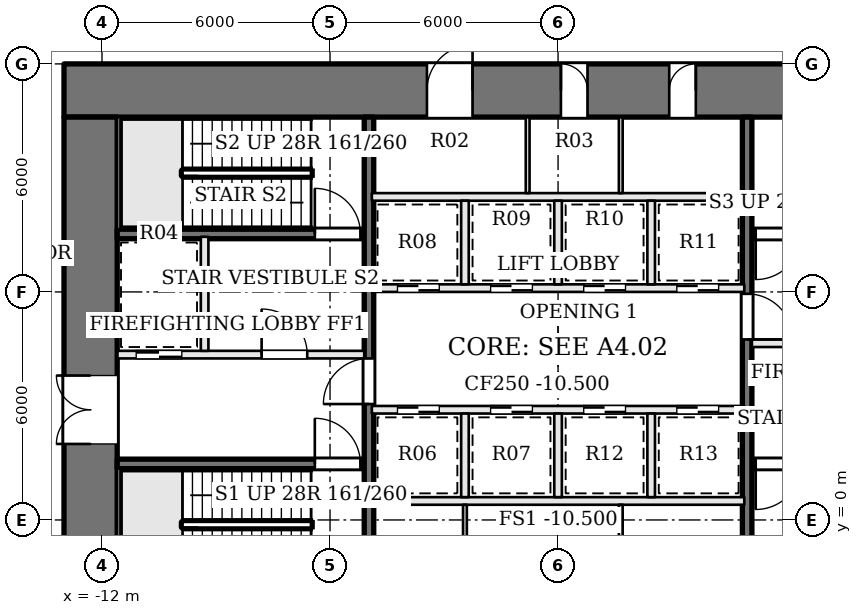
"""IFC4 building model, lengths in metres.
Left out: names, types, materials, properties, quantities, classifications, styles, units other than length and angle.
Written with IfcOpenShell. Run it as: python <this file> out.ifc"""

import sys

from ifc_helpers import new_model, si_unit, direction, frame, frame_2d, origin, place, context, subcontext, project, spatial, rectangle, extrude, element, fill, save


model = new_model("IFC4")
c1 = context("Model", 3, precision=1e-05, world=origin(), true_north=direction((0.0, 1.0)))
c2 = subcontext(c1, "Body", "Model", "MODEL_VIEW")
j1 = project(units=[si_unit("LENGTHUNIT", "METRE"), si_unit("PLANEANGLEUNIT", "RADIAN")], contexts=[c1])
p1 = place(None, origin())
s1 = spatial("IfcSite", under=j1, at=p1, CompositionType="ELEMENT")
p2 = place(p1, origin())
s2 = spatial("IfcBuilding", under=s1, at=p2, CompositionType="ELEMENT")
p3 = place(p2, frame((0.0, 0.0, -10.5)))
s3 = spatial("IfcBuildingStorey", under=s2, at=p3, CompositionType="ELEMENT", Elevation=-10.5)
p4 = place(p3, frame((-13.0, 11.3, 0.0), z_axis=(0.0, 0.0, 1.0), x_axis=(1.0, 0.0, 0.0)))
e1 = element("IfcWall", 1, at=p4, inside=s3, PredefinedType="SHEAR", context=c2, shape_type="SweptSolid", body=[
    extrude(rectangle(XDim=26.0, YDim=1.4, at=frame_2d((13.0, 0.0))), origin(), (0.0, 0.0, 1.0), 4.5),
])
p5 = place(p4, frame((9.55, 0.0, 0.0)))
e2 = element("IfcOpeningElement", 2, at=p5, cuts=e1, PredefinedType="OPENING", context=c2, shape_type="SweptSolid", body=[
    extrude(rectangle(XDim=1.2, YDim=2.1, at=frame_2d((0.6, 1.05))), frame((0.0, 0.71, 0.0), z_axis=(0.0, -1.0, 0.0), x_axis=(1.0, 0.0, 0.0)), (0.0, 0.0, 1.0), 1.42),
])
p6 = place(p4, frame((13.075, 0.0, 0.0)))
e3 = element("IfcOpeningElement", 3, at=p6, cuts=e1, PredefinedType="OPENING", context=c2, shape_type="SweptSolid", body=[
    extrude(rectangle(XDim=0.7, YDim=2.1, at=frame_2d((0.35, 1.05))), frame((0.0, 0.71, 0.0), z_axis=(0.0, -1.0, 0.0), x_axis=(1.0, 0.0, 0.0)), (0.0, 0.0, 1.0), 1.42),
])
p7 = place(p4, frame((15.925, 0.0, 0.0)))
e4 = element("IfcOpeningElement", 4, at=p7, cuts=e1, PredefinedType="OPENING", context=c2, shape_type="SweptSolid", body=[
    extrude(rectangle(XDim=0.7, YDim=2.1, at=frame_2d((0.35, 1.05))), frame((0.0, 0.71, 0.0), z_axis=(0.0, -1.0, 0.0), x_axis=(1.0, 0.0, 0.0)), (0.0, 0.0, 1.0), 1.42),
])
p8 = place(p3, frame((-12.3, -1.6, 0.0), z_axis=(0.0, 0.0, 1.0), x_axis=(0.0, 1.0, 0.0)))
e5 = element("IfcWall", 5, at=p8, inside=s3, PredefinedType="SHEAR", context=c2, shape_type="SweptSolid", body=[
    extrude(rectangle(XDim=12.2, YDim=1.4, at=frame_2d((6.1, 0.0))), origin(), (0.0, 0.0, 1.0), 4.5),
])
p9 = place(p8, frame((3.6, 0.0, 0.0)))
e6 = element("IfcOpeningElement", 6, at=p9, cuts=e5, PredefinedType="OPENING", context=c2, shape_type="SweptSolid", body=[
    extrude(rectangle(XDim=1.8, YDim=2.1, at=frame_2d((0.9, 1.05))), frame((0.0, 0.71, 0.0), z_axis=(0.0, -1.0, 0.0), x_axis=(1.0, 0.0, 0.0)), (0.0, 0.0, 1.0), 1.42),
])
p10 = place(p3, frame((-11.6, 1.475, 0.0), z_axis=(0.0, 0.0, 1.0), x_axis=(1.0, 0.0, 0.0)))
e7 = element("IfcWall", 7, at=p10, inside=s3, PredefinedType="SOLIDWALL", context=c2, shape_type="SweptSolid", body=[
    extrude(rectangle(XDim=6.5, YDim=0.25, at=frame_2d((3.25, 0.0))), origin(), (0.0, 0.0, 1.0), 4.2),
])
p11 = place(p10, frame((5.2, 0.0, 0.0)))
e8 = element("IfcOpeningElement", 8, at=p11, cuts=e7, PredefinedType="OPENING", context=c2, shape_type="SweptSolid", body=[
    extrude(rectangle(XDim=1.2, YDim=2.1, at=frame_2d((0.6, 1.05))), frame((0.0, 0.135, 0.0), z_axis=(0.0, -1.0, 0.0), x_axis=(1.0, 0.0, 0.0)), (0.0, 0.0, 1.0), 0.27),
])
p12 = place(p3, frame((11.6, 7.525, 0.0), z_axis=(0.0, 0.0, 1.0), x_axis=(-1.0, 0.0, 0.0)))
e9 = element("IfcWall", 9, at=p12, inside=s3, PredefinedType="SOLIDWALL", context=c2, shape_type="SweptSolid", body=[
    extrude(rectangle(XDim=6.5, YDim=0.25, at=frame_2d((3.25, 0.0))), origin(), (0.0, 0.0, 1.0), 4.2),
])
p13 = place(p12, frame((5.2, 0.0, 0.0)))
e10 = element("IfcOpeningElement", 10, at=p13, cuts=e9, PredefinedType="OPENING", context=c2, shape_type="SweptSolid", body=[
    extrude(rectangle(XDim=1.2, YDim=2.1, at=frame_2d((0.6, 1.05))), frame((0.0, 0.135, 0.0), z_axis=(0.0, -1.0, 0.0), x_axis=(1.0, 0.0, 0.0)), (0.0, 0.0, 1.0), 0.27),
])
p14 = place(p3, frame((-11.6, 4.35, 0.0), z_axis=(0.0, 0.0, 1.0), x_axis=(1.0, 0.0, 0.0)))
e11 = element("IfcWall", 11, at=p14, inside=s3, PredefinedType="SOLIDWALL", context=c2, shape_type="SweptSolid", body=[
    extrude(rectangle(XDim=6.5, YDim=0.2, at=frame_2d((3.25, 0.0))), origin(), (0.0, 0.0, 1.0), 4.2),
])
p15 = place(p14, frame((3.8, 0.0, 0.0)))
e12 = element("IfcOpeningElement", 12, at=p15, cuts=e11, PredefinedType="OPENING", context=c2, shape_type="SweptSolid", body=[
    extrude(rectangle(XDim=1.2, YDim=2.1, at=frame_2d((0.6, 1.05))), frame((0.0, 0.11, 0.0), z_axis=(0.0, -1.0, 0.0), x_axis=(1.0, 0.0, 0.0)), (0.0, 0.0, 1.0), 0.22),
])
p16 = place(p14, frame((0.5, 0.0, 0.0)))
e13 = element("IfcOpeningElement", 13, at=p16, cuts=e11, PredefinedType="OPENING", context=c2, shape_type="SweptSolid", body=[
    extrude(rectangle(XDim=1.2, YDim=2.1, at=frame_2d((0.6, 1.05))), frame((0.0, 0.11, 0.0), z_axis=(0.0, -1.0, 0.0), x_axis=(1.0, 0.0, 0.0)), (0.0, 0.0, 1.0), 0.22),
])
p17 = place(p3, frame((11.6, 4.65, 0.0), z_axis=(0.0, 0.0, 1.0), x_axis=(-1.0, 0.0, 0.0)))
e14 = element("IfcWall", 14, at=p17, inside=s3, PredefinedType="SOLIDWALL", context=c2, shape_type="SweptSolid", body=[
    extrude(rectangle(XDim=6.5, YDim=0.2, at=frame_2d((3.25, 0.0))), origin(), (0.0, 0.0, 1.0), 4.2),
])
p18 = place(p17, frame((3.8, 0.0, 0.0)))
e15 = element("IfcOpeningElement", 15, at=p18, cuts=e14, PredefinedType="OPENING", context=c2, shape_type="SweptSolid", body=[
    extrude(rectangle(XDim=1.2, YDim=2.1, at=frame_2d((0.6, 1.05))), frame((0.0, 0.11, 0.0), z_axis=(0.0, -1.0, 0.0), x_axis=(1.0, 0.0, 0.0)), (0.0, 0.0, 1.0), 0.22),
])
p19 = place(p17, frame((0.5, 0.0, 0.0)))
e16 = element("IfcOpeningElement", 16, at=p19, cuts=e14, PredefinedType="OPENING", context=c2, shape_type="SweptSolid", body=[
    extrude(rectangle(XDim=1.2, YDim=2.1, at=frame_2d((0.6, 1.05))), frame((0.0, 0.11, 0.0), z_axis=(0.0, -1.0, 0.0), x_axis=(1.0, 0.0, 0.0)), (0.0, 0.0, 1.0), 0.22),
])
p20 = place(p3, frame((-11.6, 7.525, 0.0), z_axis=(0.0, 0.0, 1.0), x_axis=(1.0, 0.0, 0.0)))
e17 = element("IfcWall", 17, at=p20, inside=s3, PredefinedType="SOLIDWALL", context=c2, shape_type="SweptSolid", body=[
    extrude(rectangle(XDim=6.5, YDim=0.25, at=frame_2d((3.25, 0.0))), origin(), (0.0, 0.0, 1.0), 4.2),
])
p21 = place(p20, frame((5.2, 0.0, 0.0)))
e18 = element("IfcOpeningElement", 18, at=p21, cuts=e17, PredefinedType="OPENING", context=c2, shape_type="SweptSolid", body=[
    extrude(rectangle(XDim=1.2, YDim=2.1, at=frame_2d((0.6, 1.05))), frame((0.0, 0.135, 0.0), z_axis=(0.0, -1.0, 0.0), x_axis=(1.0, 0.0, 0.0)), (0.0, 0.0, 1.0), 0.27),
])
p22 = place(p3, frame((11.6, 1.475, 0.0), z_axis=(0.0, 0.0, 1.0), x_axis=(-1.0, 0.0, 0.0)))
e19 = element("IfcWall", 19, at=p22, inside=s3, PredefinedType="SOLIDWALL", context=c2, shape_type="SweptSolid", body=[
    extrude(rectangle(XDim=6.5, YDim=0.25, at=frame_2d((3.25, 0.0))), origin(), (0.0, 0.0, 1.0), 4.2),
])
p23 = place(p22, frame((5.2, 0.0, 0.0)))
e20 = element("IfcOpeningElement", 20, at=p23, cuts=e19, PredefinedType="OPENING", context=c2, shape_type="SweptSolid", body=[
    extrude(rectangle(XDim=1.2, YDim=2.1, at=frame_2d((0.6, 1.05))), frame((0.0, 0.135, 0.0), z_axis=(0.0, -1.0, 0.0), x_axis=(1.0, 0.0, 0.0)), (0.0, 0.0, 1.0), 0.27),
])
p24 = place(p3, frame((-9.3, 4.45, 0.0), z_axis=(0.0, 0.0, 1.0), x_axis=(0.0, 1.0, 0.0)))
e21 = element("IfcWall", 21, at=p24, inside=s3, PredefinedType="SOLIDWALL", context=c2, shape_type="SweptSolid", body=[
    extrude(rectangle(XDim=3.0, YDim=0.2, at=frame_2d((1.5, 0.0))), origin(), (0.0, 0.0, 1.0), 4.2),
])
p25 = place(p3, frame((-4.975, -1.6, 0.0), z_axis=(0.0, 0.0, 1.0), x_axis=(0.0, 1.0, 0.0)))
e22 = element("IfcWall", 22, at=p25, inside=s3, PredefinedType="SOLIDWALL", context=c2, shape_type="SweptSolid", body=[
    extrude(rectangle(XDim=12.2, YDim=0.25, at=frame_2d((6.1, 0.0))), origin(), (0.0, 0.0, 1.0), 4.2),
])
p26 = place(p25, frame((4.65, 0.0, 0.0)))
e23 = element("IfcOpeningElement", 23, at=p26, cuts=e22, PredefinedType="OPENING", context=c2, shape_type="SweptSolid", body=[
    extrude(rectangle(XDim=1.2, YDim=2.1, at=frame_2d((0.6, 1.05))), frame((0.0, 0.135, 0.0), z_axis=(0.0, -1.0, 0.0), x_axis=(1.0, 0.0, 0.0)), (0.0, 0.0, 1.0), 0.27),
])
p27 = place(p3, frame((4.975, 10.6, 0.0), z_axis=(0.0, 0.0, 1.0), x_axis=(0.0, -1.0, 0.0)))
e24 = element("IfcWall", 24, at=p27, inside=s3, PredefinedType="SOLIDWALL", context=c2, shape_type="SweptSolid", body=[
    extrude(rectangle(XDim=12.2, YDim=0.25, at=frame_2d((6.1, 0.0))), origin(), (0.0, 0.0, 1.0), 4.2),
])
p28 = place(p27, frame((4.65, 0.0, 0.0)))
e25 = element("IfcOpeningElement", 25, at=p28, cuts=e24, PredefinedType="OPENING", context=c2, shape_type="SweptSolid", body=[
    extrude(rectangle(XDim=1.2, YDim=2.1, at=frame_2d((0.6, 1.05))), frame((0.0, 0.135, 0.0), z_axis=(0.0, -1.0, 0.0), x_axis=(1.0, 0.0, 0.0)), (0.0, 0.0, 1.0), 0.27),
])
p29 = place(p3, frame((-4.9, 0.5, 0.0), z_axis=(0.0, 0.0, 1.0), x_axis=(1.0, 0.0, 0.0)))
e26 = element("IfcWall", 26, at=p29, inside=s3, PredefinedType="SOLIDWALL", context=c2, shape_type="SweptSolid", body=[
    extrude(rectangle(XDim=9.8, YDim=0.2, at=frame_2d((4.9, 0.0))), origin(), (0.0, 0.0, 1.0), 4.2),
])
p30 = place(p3, frame((-4.9, 2.9, 0.0), z_axis=(0.0, 0.0, 1.0), x_axis=(1.0, 0.0, 0.0)))
e27 = element("IfcWall", 27, at=p30, inside=s3, PredefinedType="SOLIDWALL", context=c2, shape_type="SweptSolid", body=[
    extrude(rectangle(XDim=9.8, YDim=0.2, at=frame_2d((4.9, 0.0))), origin(), (0.0, 0.0, 1.0), 4.2),
])
p31 = place(p30, frame((0.675, 0.0, 0.0)))
e28 = element("IfcOpeningElement", 28, at=p31, cuts=e27, PredefinedType="OPENING", context=c2, shape_type="SweptSolid", body=[
    extrude(rectangle(XDim=1.1, YDim=2.1, at=frame_2d((0.55, 1.05))), frame((0.0, 0.11, 0.0), z_axis=(0.0, -1.0, 0.0), x_axis=(1.0, 0.0, 0.0)), (0.0, 0.0, 1.0), 0.22),
])
p32 = place(p30, frame((3.125, 0.0, 0.0)))
e29 = element("IfcOpeningElement", 29, at=p32, cuts=e27, PredefinedType="OPENING", context=c2, shape_type="SweptSolid", body=[
    extrude(rectangle(XDim=1.1, YDim=2.1, at=frame_2d((0.55, 1.05))), frame((0.0, 0.11, 0.0), z_axis=(0.0, -1.0, 0.0), x_axis=(1.0, 0.0, 0.0)), (0.0, 0.0, 1.0), 0.22),
])
p33 = place(p30, frame((5.575, 0.0, 0.0)))
e30 = element("IfcOpeningElement", 30, at=p33, cuts=e27, PredefinedType="OPENING", context=c2, shape_type="SweptSolid", body=[
    extrude(rectangle(XDim=1.1, YDim=2.1, at=frame_2d((0.55, 1.05))), frame((0.0, 0.11, 0.0), z_axis=(0.0, -1.0, 0.0), x_axis=(1.0, 0.0, 0.0)), (0.0, 0.0, 1.0), 0.22),
])
p34 = place(p30, frame((8.025, 0.0, 0.0)))
e31 = element("IfcOpeningElement", 31, at=p34, cuts=e27, PredefinedType="OPENING", context=c2, shape_type="SweptSolid", body=[
    extrude(rectangle(XDim=1.1, YDim=2.1, at=frame_2d((0.55, 1.05))), frame((0.0, 0.11, 0.0), z_axis=(0.0, -1.0, 0.0), x_axis=(1.0, 0.0, 0.0)), (0.0, 0.0, 1.0), 0.22),
])
p35 = place(p3, frame((-4.9, 6.1, 0.0), z_axis=(0.0, 0.0, 1.0), x_axis=(1.0, 0.0, 0.0)))
e32 = element("IfcWall", 32, at=p35, inside=s3, PredefinedType="SOLIDWALL", context=c2, shape_type="SweptSolid", body=[
    extrude(rectangle(XDim=9.8, YDim=0.2, at=frame_2d((4.9, 0.0))), origin(), (0.0, 0.0, 1.0), 4.2),
])
p36 = place(p35, frame((0.675, 0.0, 0.0)))
e33 = element("IfcOpeningElement", 33, at=p36, cuts=e32, PredefinedType="OPENING", context=c2, shape_type="SweptSolid", body=[
    extrude(rectangle(XDim=1.1, YDim=2.1, at=frame_2d((0.55, 1.05))), frame((0.0, 0.11, 0.0), z_axis=(0.0, -1.0, 0.0), x_axis=(1.0, 0.0, 0.0)), (0.0, 0.0, 1.0), 0.22),
])
p37 = place(p35, frame((3.125, 0.0, 0.0)))
e34 = element("IfcOpeningElement", 34, at=p37, cuts=e32, PredefinedType="OPENING", context=c2, shape_type="SweptSolid", body=[
    extrude(rectangle(XDim=1.1, YDim=2.1, at=frame_2d((0.55, 1.05))), frame((0.0, 0.11, 0.0), z_axis=(0.0, -1.0, 0.0), x_axis=(1.0, 0.0, 0.0)), (0.0, 0.0, 1.0), 0.22),
])
p38 = place(p35, frame((5.575, 0.0, 0.0)))
e35 = element("IfcOpeningElement", 35, at=p38, cuts=e32, PredefinedType="OPENING", context=c2, shape_type="SweptSolid", body=[
    extrude(rectangle(XDim=1.1, YDim=2.1, at=frame_2d((0.55, 1.05))), frame((0.0, 0.11, 0.0), z_axis=(0.0, -1.0, 0.0), x_axis=(1.0, 0.0, 0.0)), (0.0, 0.0, 1.0), 0.22),
])
p39 = place(p35, frame((8.025, 0.0, 0.0)))
e36 = element("IfcOpeningElement", 36, at=p39, cuts=e32, PredefinedType="OPENING", context=c2, shape_type="SweptSolid", body=[
    extrude(rectangle(XDim=1.1, YDim=2.1, at=frame_2d((0.55, 1.05))), frame((0.0, 0.11, 0.0), z_axis=(0.0, -1.0, 0.0), x_axis=(1.0, 0.0, 0.0)), (0.0, 0.0, 1.0), 0.22),
])
p40 = place(p3, frame((-4.9, 8.5, 0.0), z_axis=(0.0, 0.0, 1.0), x_axis=(1.0, 0.0, 0.0)))
e37 = element("IfcWall", 37, at=p40, inside=s3, PredefinedType="SOLIDWALL", context=c2, shape_type="SweptSolid", body=[
    extrude(rectangle(XDim=9.8, YDim=0.2, at=frame_2d((4.9, 0.0))), origin(), (0.0, 0.0, 1.0), 4.2),
])
for number, where, z_axis, x_axis in (
    (38, (-2.45, 0.6, 0.0), (0.0, 0.0, 1.0), (0.0, 1.0, 0.0)),
    (39, (0.0, 0.6, 0.0), (0.0, 0.0, 1.0), (0.0, 1.0, 0.0)),
    (40, (2.45, 0.6, 0.0), (0.0, 0.0, 1.0), (0.0, 1.0, 0.0)),
    (41, (-2.45, 6.2, 0.0), (0.0, 0.0, 1.0), (0.0, 1.0, 0.0)),
    (42, (0.0, 6.2, 0.0), (0.0, 0.0, 1.0), (0.0, 1.0, 0.0)),
    (43, (2.45, 6.2, 0.0), (0.0, 0.0, 1.0), (0.0, 1.0, 0.0)),
):
    element("IfcWall", number, at=place(p3, frame(where, z_axis=z_axis, x_axis=x_axis)), inside=s3, PredefinedType="SOLIDWALL", context=c2, shape_type="SweptSolid", body=[
        extrude(rectangle(XDim=2.2, YDim=0.2, at=frame_2d((1.1, 0.0))), origin(), (0.0, 0.0, 1.0), 4.2),
    ])
for number, where, z_axis, x_axis in (
    (44, (-2.45, -1.6, 0.0), (0.0, 0.0, 1.0), (0.0, 1.0, 0.0)),
    (45, (1.65, -1.6, 0.0), (0.0, 0.0, 1.0), (0.0, 1.0, 0.0)),
    (46, (-0.8, 8.6, 0.0), (0.0, 0.0, 1.0), (0.0, 1.0, 0.0)),
    (47, (1.65, 8.6, 0.0), (0.0, 0.0, 1.0), (0.0, 1.0, 0.0)),
):
    element("IfcWall", number, at=place(p3, frame(where, z_axis=z_axis, x_axis=x_axis)), inside=s3, PredefinedType="PARTITIONING", context=c2, shape_type="SweptSolid", body=[
        extrude(rectangle(XDim=2.0, YDim=0.1, at=frame_2d((1.0, 0.0))), origin(), (0.0, 0.0, 1.0), 4.2),
    ])
p41 = place(p9, origin())
e48 = element("IfcDoor", 48, at=p41, inside=s3, OperationType="DOUBLE_DOOR_SINGLE_SWING", PredefinedType="DOOR", context=c2, shape_type="SweptSolid", body=[
    extrude(rectangle(XDim=1.8, YDim=2.1, at=frame_2d((0.9, 1.05))), frame((0.0, 0.025, 0.0), z_axis=(0.0, -1.0, 0.0), x_axis=(1.0, 0.0, 0.0)), (0.0, 0.0, 1.0), 0.05),
])
fill(e6, e48)
p42 = place(p26, origin())
e49 = element("IfcDoor", 49, at=p42, inside=s3, OperationType="SINGLE_SWING_LEFT", PredefinedType="DOOR", context=c2, shape_type="SweptSolid", body=[
    extrude(rectangle(XDim=1.2, YDim=2.1, at=frame_2d((0.6, 1.05))), frame((0.0, 0.025, 0.0), z_axis=(0.0, -1.0, 0.0), x_axis=(1.0, 0.0, 0.0)), (0.0, 0.0, 1.0), 0.05),
])
fill(e23, e49)
p43 = place(p28, origin())
e50 = element("IfcDoor", 50, at=p43, inside=s3, OperationType="SINGLE_SWING_RIGHT", PredefinedType="DOOR", context=c2, shape_type="SweptSolid", body=[
    extrude(rectangle(XDim=1.2, YDim=2.1, at=frame_2d((0.6, 1.05))), frame((0.0, 0.025, 0.0), z_axis=(0.0, -1.0, 0.0), x_axis=(1.0, 0.0, 0.0)), (0.0, 0.0, 1.0), 0.05),
])
fill(e25, e50)
p44 = place(p15, origin())
e51 = element("IfcDoor", 51, at=p44, inside=s3, OperationType="SINGLE_SWING_LEFT", PredefinedType="DOOR", context=c2, shape_type="SweptSolid", body=[
    extrude(rectangle(XDim=1.2, YDim=2.1, at=frame_2d((0.6, 1.05))), frame((0.0, 0.025, 0.0), z_axis=(0.0, -1.0, 0.0), x_axis=(1.0, 0.0, 0.0)), (0.0, 0.0, 1.0), 0.05),
])
fill(e12, e51)
p45 = place(p11, origin())
e52 = element("IfcDoor", 52, at=p45, inside=s3, OperationType="SINGLE_SWING_LEFT", PredefinedType="DOOR", context=c2, shape_type="SweptSolid", body=[
    extrude(rectangle(XDim=1.2, YDim=2.1, at=frame_2d((0.6, 1.05))), frame((0.0, 0.025, 0.0), z_axis=(0.0, -1.0, 0.0), x_axis=(1.0, 0.0, 0.0)), (0.0, 0.0, 1.0), 0.05),
])
fill(e8, e52)
p46 = place(p13, origin())
e53 = element("IfcDoor", 53, at=p46, inside=s3, OperationType="SINGLE_SWING_RIGHT", PredefinedType="DOOR", context=c2, shape_type="SweptSolid", body=[
    extrude(rectangle(XDim=1.2, YDim=2.1, at=frame_2d((0.6, 1.05))), frame((0.0, 0.025, 0.0), z_axis=(0.0, -1.0, 0.0), x_axis=(1.0, 0.0, 0.0)), (0.0, 0.0, 1.0), 0.05),
])
fill(e10, e53)
p47 = place(p21, origin())
e54 = element("IfcDoor", 54, at=p47, inside=s3, OperationType="SINGLE_SWING_LEFT", PredefinedType="DOOR", context=c2, shape_type="SweptSolid", body=[
    extrude(rectangle(XDim=1.2, YDim=2.1, at=frame_2d((0.6, 1.05))), frame((0.0, 0.025, 0.0), z_axis=(0.0, -1.0, 0.0), x_axis=(1.0, 0.0, 0.0)), (0.0, 0.0, 1.0), 0.05),
])
fill(e18, e54)
p48 = place(p23, origin())
e55 = element("IfcDoor", 55, at=p48, inside=s3, OperationType="SINGLE_SWING_RIGHT", PredefinedType="DOOR", context=c2, shape_type="SweptSolid", body=[
    extrude(rectangle(XDim=1.2, YDim=2.1, at=frame_2d((0.6, 1.05))), frame((0.0, 0.025, 0.0), z_axis=(0.0, -1.0, 0.0), x_axis=(1.0, 0.0, 0.0)), (0.0, 0.0, 1.0), 0.05),
])
fill(e20, e55)
p49 = place(p16, origin())
e56 = element("IfcDoor", 56, at=p49, inside=s3, OperationType="SLIDING_TO_RIGHT", PredefinedType="DOOR", context=c2, shape_type="SweptSolid", body=[
    extrude(rectangle(XDim=1.2, YDim=2.1, at=frame_2d((0.6, 1.05))), frame((0.0, 0.025, 0.0), z_axis=(0.0, -1.0, 0.0), x_axis=(1.0, 0.0, 0.0)), (0.0, 0.0, 1.0), 0.05),
])
fill(e13, e56)
p50 = place(p31, origin())
e57 = element("IfcDoor", 57, at=p50, inside=s3, OperationType="SLIDING_TO_RIGHT", PredefinedType="DOOR", context=c2, shape_type="SweptSolid", body=[
    extrude(rectangle(XDim=1.1, YDim=2.1, at=frame_2d((0.55, 1.05))), frame((0.0, 0.025, 0.0), z_axis=(0.0, -1.0, 0.0), x_axis=(1.0, 0.0, 0.0)), (0.0, 0.0, 1.0), 0.05),
])
fill(e28, e57)
p51 = place(p32, origin())
e58 = element("IfcDoor", 58, at=p51, inside=s3, OperationType="SLIDING_TO_LEFT", PredefinedType="DOOR", context=c2, shape_type="SweptSolid", body=[
    extrude(rectangle(XDim=1.1, YDim=2.1, at=frame_2d((0.55, 1.05))), frame((0.0, 0.025, 0.0), z_axis=(0.0, -1.0, 0.0), x_axis=(1.0, 0.0, 0.0)), (0.0, 0.0, 1.0), 0.05),
])
fill(e29, e58)
p52 = place(p33, origin())
e59 = element("IfcDoor", 59, at=p52, inside=s3, OperationType="SLIDING_TO_LEFT", PredefinedType="DOOR", context=c2, shape_type="SweptSolid", body=[
    extrude(rectangle(XDim=1.1, YDim=2.1, at=frame_2d((0.55, 1.05))), frame((0.0, 0.025, 0.0), z_axis=(0.0, -1.0, 0.0), x_axis=(1.0, 0.0, 0.0)), (0.0, 0.0, 1.0), 0.05),
])
fill(e30, e59)
p53 = place(p34, origin())
e60 = element("IfcDoor", 60, at=p53, inside=s3, OperationType="SLIDING_TO_RIGHT", PredefinedType="DOOR", context=c2, shape_type="SweptSolid", body=[
    extrude(rectangle(XDim=1.1, YDim=2.1, at=frame_2d((0.55, 1.05))), frame((0.0, 0.025, 0.0), z_axis=(0.0, -1.0, 0.0), x_axis=(1.0, 0.0, 0.0)), (0.0, 0.0, 1.0), 0.05),
])
fill(e31, e60)
p54 = place(p36, origin())
e61 = element("IfcDoor", 61, at=p54, inside=s3, OperationType="SLIDING_TO_RIGHT", PredefinedType="DOOR", context=c2, shape_type="SweptSolid", body=[
    extrude(rectangle(XDim=1.1, YDim=2.1, at=frame_2d((0.55, 1.05))), frame((0.0, 0.025, 0.0), z_axis=(0.0, -1.0, 0.0), x_axis=(1.0, 0.0, 0.0)), (0.0, 0.0, 1.0), 0.05),
])
fill(e33, e61)
p55 = place(p37, origin())
e62 = element("IfcDoor", 62, at=p55, inside=s3, OperationType="SLIDING_TO_LEFT", PredefinedType="DOOR", context=c2, shape_type="SweptSolid", body=[
    extrude(rectangle(XDim=1.1, YDim=2.1, at=frame_2d((0.55, 1.05))), frame((0.0, 0.025, 0.0), z_axis=(0.0, -1.0, 0.0), x_axis=(1.0, 0.0, 0.0)), (0.0, 0.0, 1.0), 0.05),
])
fill(e34, e62)
p56 = place(p38, origin())
e63 = element("IfcDoor", 63, at=p56, inside=s3, OperationType="SLIDING_TO_RIGHT", PredefinedType="DOOR", context=c2, shape_type="SweptSolid", body=[
    extrude(rectangle(XDim=1.1, YDim=2.1, at=frame_2d((0.55, 1.05))), frame((0.0, 0.025, 0.0), z_axis=(0.0, -1.0, 0.0), x_axis=(1.0, 0.0, 0.0)), (0.0, 0.0, 1.0), 0.05),
])
fill(e35, e63)
p57 = place(p39, origin())
e64 = element("IfcDoor", 64, at=p57, inside=s3, OperationType="SLIDING_TO_LEFT", PredefinedType="DOOR", context=c2, shape_type="SweptSolid", body=[
    extrude(rectangle(XDim=1.1, YDim=2.1, at=frame_2d((0.55, 1.05))), frame((0.0, 0.025, 0.0), z_axis=(0.0, -1.0, 0.0), x_axis=(1.0, 0.0, 0.0)), (0.0, 0.0, 1.0), 0.05),
])
fill(e36, e64)
p58 = place(p5, origin())
e65 = element("IfcDoor", 65, at=p58, inside=s3, OperationType="SINGLE_SWING_RIGHT", PredefinedType="DOOR", context=c2, shape_type="SweptSolid", body=[
    extrude(rectangle(XDim=1.2, YDim=2.1, at=frame_2d((0.6, 1.05))), frame((0.0, 0.025, 0.0), z_axis=(0.0, -1.0, 0.0), x_axis=(1.0, 0.0, 0.0)), (0.0, 0.0, 1.0), 0.05),
])
fill(e2, e65)
p59 = place(p6, origin())
e66 = element("IfcDoor", 66, at=p59, inside=s3, OperationType="SINGLE_SWING_LEFT", PredefinedType="DOOR", context=c2, shape_type="SweptSolid", body=[
    extrude(rectangle(XDim=0.7, YDim=2.1, at=frame_2d((0.35, 1.05))), frame((0.0, 0.025, 0.0), z_axis=(0.0, -1.0, 0.0), x_axis=(1.0, 0.0, 0.0)), (0.0, 0.0, 1.0), 0.05),
])
fill(e3, e66)
p60 = place(p7, origin())
e67 = element("IfcDoor", 67, at=p60, inside=s3, OperationType="SINGLE_SWING_RIGHT", PredefinedType="DOOR", context=c2, shape_type="SweptSolid", body=[
    extrude(rectangle(XDim=0.7, YDim=2.1, at=frame_2d((0.35, 1.05))), frame((0.0, 0.025, 0.0), z_axis=(0.0, -1.0, 0.0), x_axis=(1.0, 0.0, 0.0)), (0.0, 0.0, 1.0), 0.05),
])
fill(e4, e67)
save(model, sys.argv[1])
